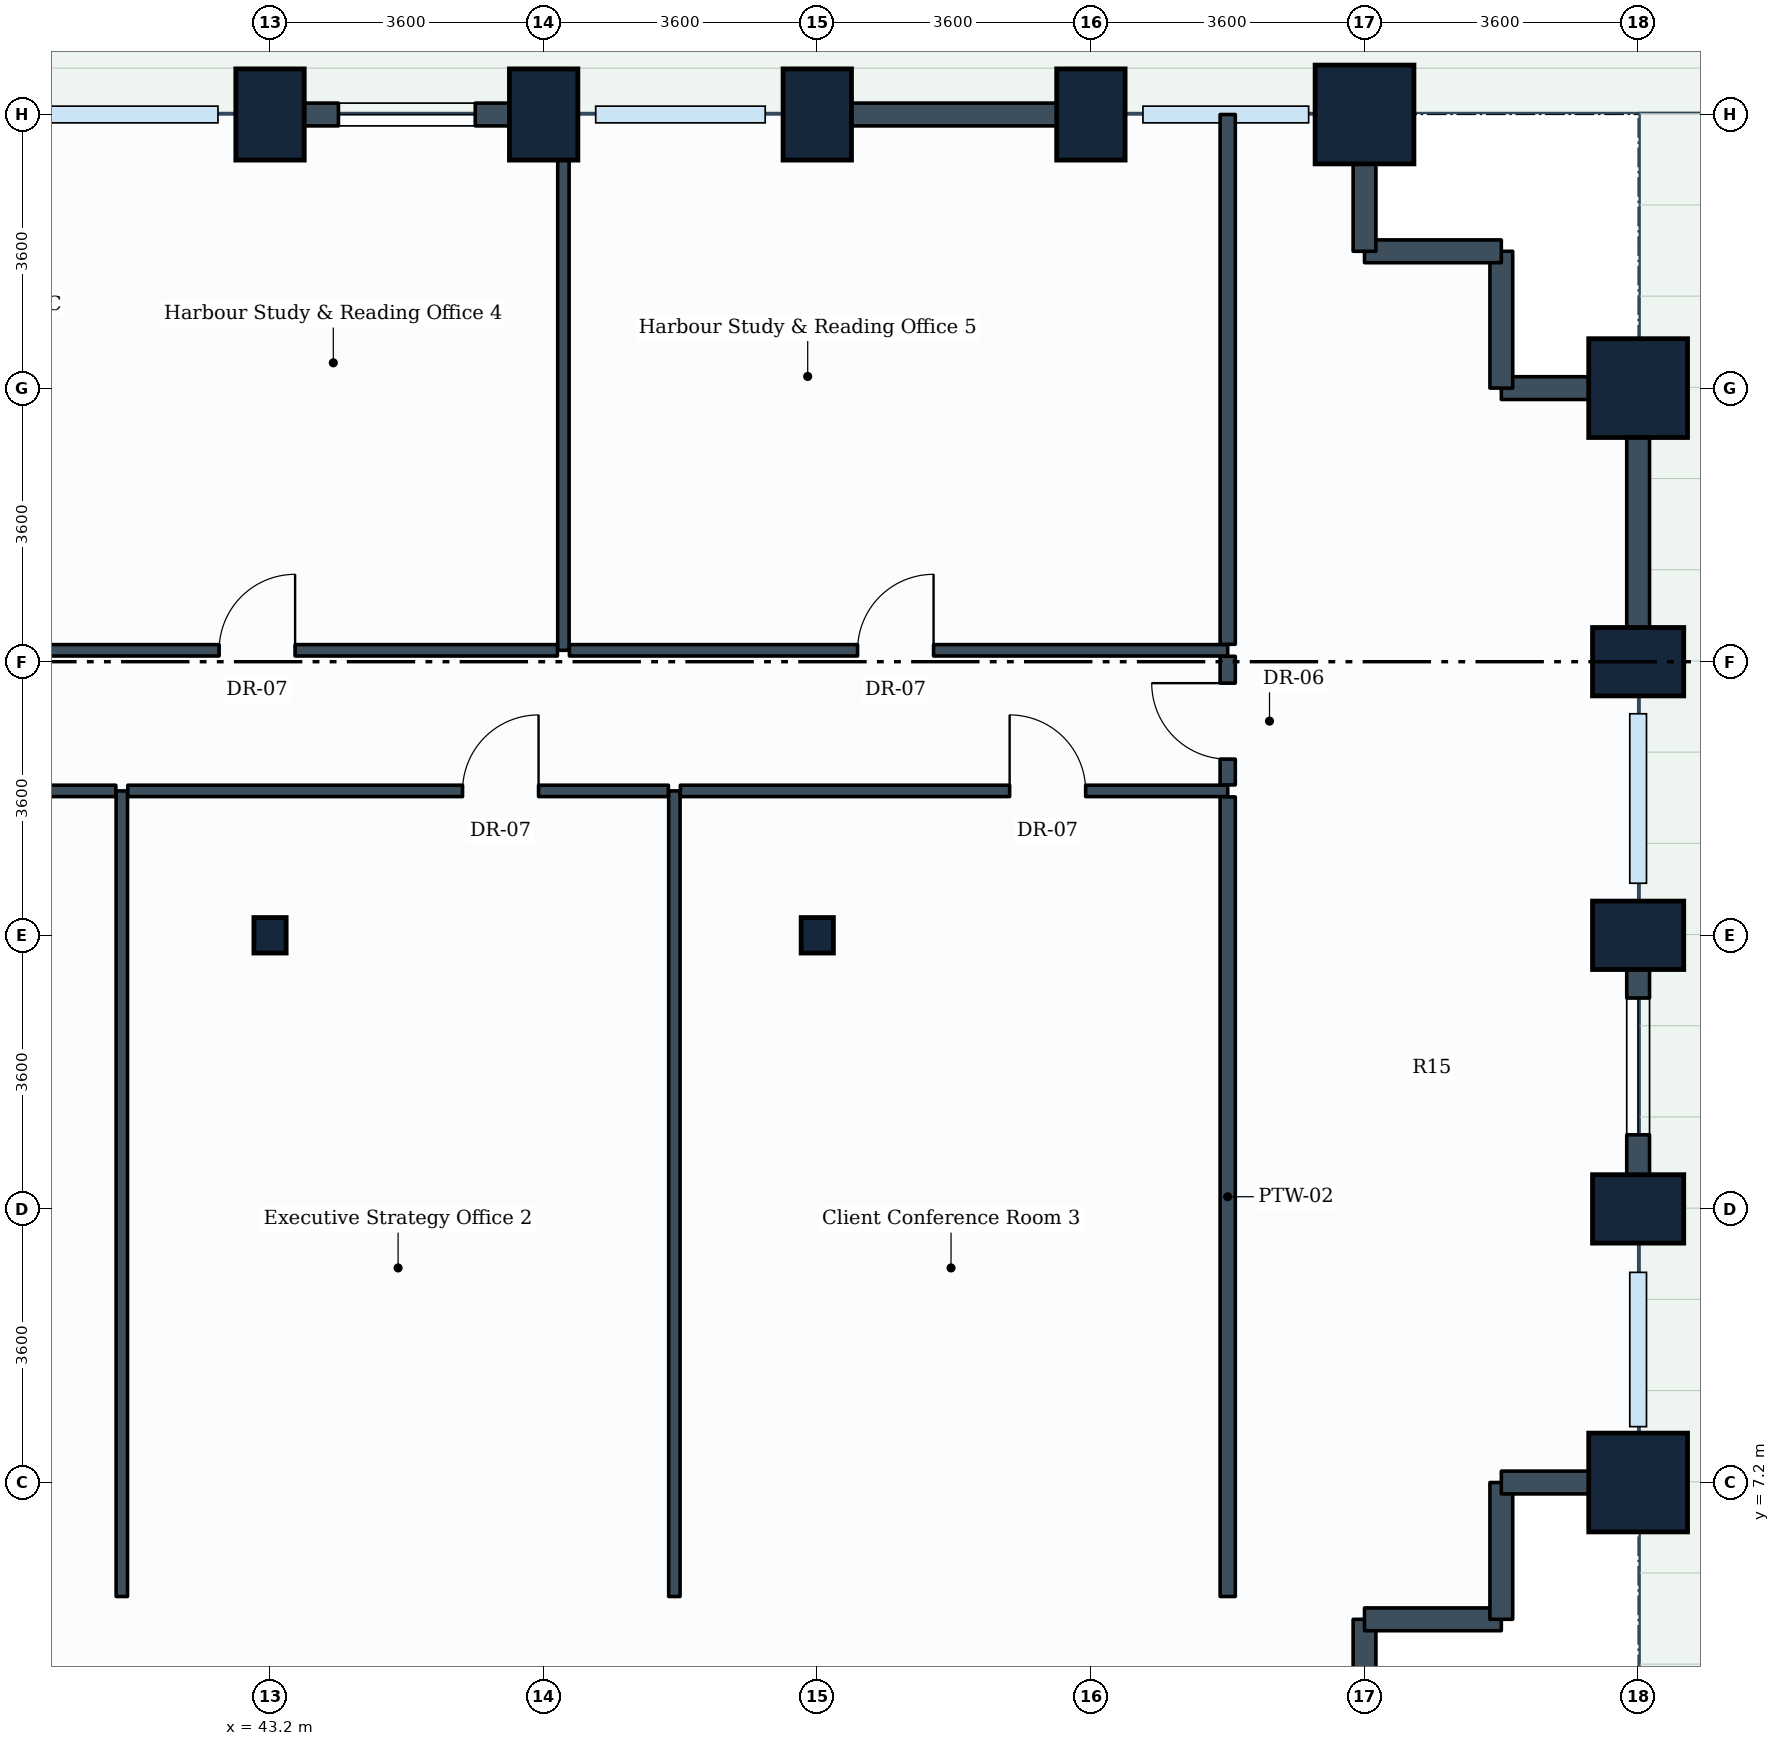
"""IFC4 building model, lengths in metres.
Left out: names, types, materials, properties, quantities, classifications, styles, units other than length and angle.
Written with IfcOpenShell. Run it as: python <this file> out.ifc"""

import sys

from ifc_helpers import new_model, si_unit, direction, frame, frame_2d, origin, origin_2d, place, context, subcontext, project, spatial, rectangle, i_section, extrude, element, fill, save


model = new_model("IFC4")
c1 = context("Model", 3, precision=1e-05, world=origin(), true_north=direction((0.0, 1.0)))
c2 = subcontext(c1, "Body", "Model", "MODEL_VIEW")
j1 = project(units=[si_unit("LENGTHUNIT", "METRE"), si_unit("PLANEANGLEUNIT", "RADIAN")], contexts=[c1])
p1 = place(None, origin())
s1 = spatial("IfcSite", under=j1, at=p1, CompositionType="ELEMENT")
p2 = place(p1, origin())
s2 = spatial("IfcBuilding", under=s1, at=p2, CompositionType="ELEMENT")
p3 = place(p2, frame((0.0, 0.0, 24.0)))
s3 = spatial("IfcBuildingStorey", under=s2, at=p3, CompositionType="ELEMENT", Elevation=24.0)
p4 = place(p3, frame((43.2, 14.4, 0.0), z_axis=(0.0, 0.0, 1.0), x_axis=(1.0, 0.0, 0.0)))
e1 = element("IfcColumn", 1, at=p4, inside=s3, PredefinedType="COLUMN", context=c2, shape_type="SweptSolid", body=[
    extrude(i_section(OverallWidth=0.424, OverallDepth=0.467, WebThickness=0.033, FlangeThickness=0.053, FilletRadius=0.015, at=origin_2d()), origin(), (0.0, 0.0, 1.0), 3.9),
])
for number, where, z_axis, x_axis in (
    (2, (43.2, 25.2, 0.0), (0.0, 0.0, 1.0), (1.0, 0.0, 0.0)),
    (3, (46.8, 25.2, 0.0), (0.0, 0.0, 1.0), (1.0, 0.0, 0.0)),
):
    element("IfcColumn", number, at=place(p3, frame(where, z_axis=z_axis, x_axis=x_axis)), inside=s3, PredefinedType="COLUMN", context=c2, shape_type="SweptSolid", body=[
        extrude(rectangle(XDim=0.9, YDim=1.2, at=origin_2d()), origin(), (0.0, 0.0, 1.0), 3.9),
    ])
p5 = place(p3, frame((50.4, 14.4, 0.0), z_axis=(0.0, 0.0, 1.0), x_axis=(1.0, 0.0, 0.0)))
e4 = element("IfcColumn", 4, at=p5, inside=s3, PredefinedType="COLUMN", context=c2, shape_type="SweptSolid", body=[
    extrude(i_section(OverallWidth=0.424, OverallDepth=0.467, WebThickness=0.033, FlangeThickness=0.053, FilletRadius=0.015, at=origin_2d()), origin(), (0.0, 0.0, 1.0), 3.9),
])
for number, where, z_axis, x_axis in (
    (5, (50.4, 25.2, 0.0), (0.0, 0.0, 1.0), (1.0, 0.0, 0.0)),
    (6, (54.0, 25.2, 0.0), (0.0, 0.0, 1.0), (1.0, 0.0, 0.0)),
):
    element("IfcColumn", number, at=place(p3, frame(where, z_axis=z_axis, x_axis=x_axis)), inside=s3, PredefinedType="COLUMN", context=c2, shape_type="SweptSolid", body=[
        extrude(rectangle(XDim=0.9, YDim=1.2, at=origin_2d()), origin(), (0.0, 0.0, 1.0), 3.9),
    ])
for number, where, z_axis, x_axis in (
    (7, (57.6, 25.2, 0.0), (0.0, 0.0, 1.0), (1.0, 0.0, 0.0)),
    (8, (61.2, 7.2, 0.0), (0.0, 0.0, 1.0), (1.0, 0.0, 0.0)),
):
    element("IfcColumn", number, at=place(p3, frame(where, z_axis=z_axis, x_axis=x_axis)), inside=s3, PredefinedType="COLUMN", context=c2, shape_type="SweptSolid", body=[
        extrude(rectangle(XDim=1.3, YDim=1.3, at=origin_2d()), origin(), (0.0, 0.0, 1.0), 3.9),
    ])
for number, where, z_axis, x_axis in (
    (9, (61.2, 10.8, 0.0), (0.0, 0.0, 1.0), (0.0, 1.0, 0.0)),
    (10, (61.2, 14.4, 0.0), (0.0, 0.0, 1.0), (0.0, 1.0, 0.0)),
    (11, (61.2, 18.0, 0.0), (0.0, 0.0, 1.0), (0.0, 1.0, 0.0)),
):
    element("IfcColumn", number, at=place(p3, frame(where, z_axis=z_axis, x_axis=x_axis)), inside=s3, PredefinedType="COLUMN", context=c2, shape_type="SweptSolid", body=[
        extrude(rectangle(XDim=0.9, YDim=1.2, at=origin_2d()), origin(), (0.0, 0.0, 1.0), 3.9),
    ])
p6 = place(p3, frame((61.2, 21.6, 0.0), z_axis=(0.0, 0.0, 1.0), x_axis=(0.0, 1.0, 0.0)))
e12 = element("IfcColumn", 12, at=p6, inside=s3, PredefinedType="COLUMN", context=c2, shape_type="SweptSolid", body=[
    extrude(rectangle(XDim=1.3, YDim=1.3, at=origin_2d()), origin(), (0.0, 0.0, 1.0), 3.9),
])
p7 = place(p3, frame((57.6, 5.4, 0.0), z_axis=(0.0, 0.0, 1.0), x_axis=(0.0, -1.0, 0.0)))
e13 = element("IfcWall", 13, at=p7, inside=s3, PredefinedType="STANDARD", context=c2, shape_type="SweptSolid", body=[
    extrude(rectangle(XDim=1.8, YDim=0.3, at=frame_2d((0.9, 0.0))), origin(), (0.0, 0.0, 1.0), 2.93),
])
p8 = place(p3, frame((59.4, 5.4, 0.0), z_axis=(0.0, 0.0, 1.0), x_axis=(-1.0, 0.0, 0.0)))
e14 = element("IfcWall", 14, at=p8, inside=s3, PredefinedType="STANDARD", context=c2, shape_type="SweptSolid", body=[
    extrude(rectangle(XDim=1.8, YDim=0.3, at=frame_2d((0.9, 0.0))), origin(), (0.0, 0.0, 1.0), 3.635),
])
p9 = place(p3, frame((59.4, 7.2, 0.0), z_axis=(0.0, 0.0, 1.0), x_axis=(0.0, -1.0, 0.0)))
e15 = element("IfcWall", 15, at=p9, inside=s3, PredefinedType="STANDARD", context=c2, shape_type="SweptSolid", body=[
    extrude(rectangle(XDim=1.8, YDim=0.3, at=frame_2d((0.9, 0.0))), origin(), (0.0, 0.0, 1.0), 3.635),
])
p10 = place(p3, frame((61.2, 7.2, 0.0), z_axis=(0.0, 0.0, 1.0), x_axis=(-1.0, 0.0, 0.0)))
e16 = element("IfcWall", 16, at=p10, inside=s3, PredefinedType="STANDARD", context=c2, shape_type="SweptSolid", body=[
    extrude(rectangle(XDim=1.8, YDim=0.3, at=frame_2d((0.9, 0.0))), origin(), (0.0, 0.0, 1.0), 2.93),
])
p11 = place(p3, frame((61.2, 14.4, 0.0), z_axis=(0.0, 0.0, 1.0), x_axis=(0.0, -1.0, 0.0)))
e17 = element("IfcWall", 17, at=p11, inside=s3, PredefinedType="STANDARD", context=c2, shape_type="SweptSolid", body=[
    extrude(rectangle(XDim=3.6, YDim=0.3, at=frame_2d((1.8, 0.0))), origin(), (0.0, 0.0, 1.0), 2.93),
])
p12 = place(p11, frame((0.825, 0.0, 0.85)))
e18 = element("IfcOpeningElement", 18, at=p12, cuts=e17, PredefinedType="OPENING", context=c2, shape_type="SweptSolid", body=[
    extrude(rectangle(XDim=1.8, YDim=1.35, at=frame_2d((0.9, 0.675))), frame((0.0, 0.16, 0.0), z_axis=(0.0, -1.0, 0.0), x_axis=(1.0, 0.0, 0.0)), (0.0, 0.0, 1.0), 0.32),
])
p13 = place(p3, frame((61.2, 21.6, 0.0), z_axis=(0.0, 0.0, 1.0), x_axis=(0.0, -1.0, 0.0)))
e19 = element("IfcWall", 19, at=p13, inside=s3, PredefinedType="STANDARD", context=c2, shape_type="SweptSolid", body=[
    extrude(rectangle(XDim=3.6, YDim=0.3, at=frame_2d((1.8, 0.0))), origin(), (0.0, 0.0, 1.0), 2.93),
])
p14 = place(p3, frame((61.2, 21.6, 0.0), z_axis=(0.0, 0.0, 1.0), x_axis=(-1.0, 0.0, 0.0)))
e20 = element("IfcWall", 20, at=p14, inside=s3, PredefinedType="STANDARD", context=c2, shape_type="SweptSolid", body=[
    extrude(rectangle(XDim=1.8, YDim=0.3, at=frame_2d((0.9, 0.0))), origin(), (0.0, 0.0, 1.0), 2.93),
])
for number, where, z_axis, x_axis in (
    (21, (59.4, 23.4, 0.0), (0.0, 0.0, 1.0), (0.0, -1.0, 0.0)),
    (22, (57.6, 23.4, 0.0), (0.0, 0.0, 1.0), (1.0, 0.0, 0.0)),
):
    element("IfcWall", number, at=place(p3, frame(where, z_axis=z_axis, x_axis=x_axis)), inside=s3, PredefinedType="STANDARD", context=c2, shape_type="SweptSolid", body=[
        extrude(rectangle(XDim=1.8, YDim=0.3, at=frame_2d((0.9, 0.0))), origin(), (0.0, 0.0, 1.0), 3.635),
    ])
p15 = place(p3, frame((57.6, 25.2, 0.0), z_axis=(0.0, 0.0, 1.0), x_axis=(0.0, -1.0, 0.0)))
e23 = element("IfcWall", 23, at=p15, inside=s3, PredefinedType="STANDARD", context=c2, shape_type="SweptSolid", body=[
    extrude(rectangle(XDim=1.8, YDim=0.3, at=frame_2d((0.9, 0.0))), origin(), (0.0, 0.0, 1.0), 2.93),
])
p16 = place(p3, frame((50.4, 25.2, 0.0), z_axis=(0.0, 0.0, 1.0), x_axis=(1.0, 0.0, 0.0)))
e24 = element("IfcWall", 24, at=p16, inside=s3, PredefinedType="STANDARD", context=c2, shape_type="SweptSolid", body=[
    extrude(rectangle(XDim=3.6, YDim=0.3, at=frame_2d((1.8, 0.0))), origin(), (0.0, 0.0, 1.0), 2.93),
])
p17 = place(p3, frame((43.2, 25.2, 0.0), z_axis=(0.0, 0.0, 1.0), x_axis=(1.0, 0.0, 0.0)))
e25 = element("IfcWall", 25, at=p17, inside=s3, PredefinedType="STANDARD", context=c2, shape_type="SweptSolid", body=[
    extrude(rectangle(XDim=3.6, YDim=0.3, at=frame_2d((1.8, 0.0))), origin(), (0.0, 0.0, 1.0), 2.93),
])
p18 = place(p17, frame((0.9, 0.0, 0.85)))
e26 = element("IfcOpeningElement", 26, at=p18, cuts=e25, PredefinedType="OPENING", context=c2, shape_type="SweptSolid", body=[
    extrude(rectangle(XDim=1.8, YDim=1.35, at=frame_2d((0.9, 0.675))), frame((0.0, 0.16, 0.0), z_axis=(0.0, -1.0, 0.0), x_axis=(1.0, 0.0, 0.0)), (0.0, 0.0, 1.0), 0.32),
])
p19 = place(p3, frame((41.25, 5.7, 0.0), z_axis=(0.0, 0.0, 1.0), x_axis=(0.0, 1.0, 0.0)))
e27 = element("IfcWall", 27, at=p19, inside=s3, PredefinedType="PARTITIONING", context=c2, shape_type="SweptSolid", body=[
    extrude(rectangle(XDim=10.6, YDim=0.15, at=frame_2d((5.3, 0.0))), origin(), (0.0, 0.0, 1.0), 3.03),
])
p20 = place(p3, frame((34.479, 16.3, 0.0), z_axis=(0.0, 0.0, 1.0), x_axis=(1.0, 0.0, 0.0)))
e28 = element("IfcWall", 28, at=p20, inside=s3, PredefinedType="PARTITIONING", context=c2, shape_type="SweptSolid", body=[
    extrude(rectangle(XDim=6.692, YDim=0.15, at=frame_2d((3.346, 0.0))), origin(), (0.0, 0.0, 1.0), 3.04),
])
p21 = place(p20, frame((2.807, 0.0, 0.0)))
e29 = element("IfcOpeningElement", 29, at=p21, cuts=e28, PredefinedType="OPENING", context=c2, shape_type="SweptSolid", body=[
    extrude(rectangle(XDim=1.0, YDim=2.1, at=frame_2d((0.5, 1.05))), frame((0.0, 0.085, 0.0), z_axis=(0.0, -1.0, 0.0), x_axis=(1.0, 0.0, 0.0)), (0.0, 0.0, 1.0), 0.17),
])
p22 = place(p3, frame((48.52, 5.7, 0.0), z_axis=(0.0, 0.0, 1.0), x_axis=(0.0, 1.0, 0.0)))
e30 = element("IfcWall", 30, at=p22, inside=s3, PredefinedType="PARTITIONING", context=c2, shape_type="SweptSolid", body=[
    extrude(rectangle(XDim=10.6, YDim=0.15, at=frame_2d((5.3, 0.0))), origin(), (0.0, 0.0, 1.0), 3.03),
])
p23 = place(p3, frame((41.329, 16.3, 0.0), z_axis=(0.0, 0.0, 1.0), x_axis=(1.0, 0.0, 0.0)))
e31 = element("IfcWall", 31, at=p23, inside=s3, PredefinedType="PARTITIONING", context=c2, shape_type="SweptSolid", body=[
    extrude(rectangle(XDim=7.112, YDim=0.15, at=frame_2d((3.556, 0.0))), origin(), (0.0, 0.0, 1.0), 3.04),
])
p24 = place(p23, frame((4.404, 0.0, 0.0)))
e32 = element("IfcOpeningElement", 32, at=p24, cuts=e31, PredefinedType="OPENING", context=c2, shape_type="SweptSolid", body=[
    extrude(rectangle(XDim=1.0, YDim=2.1, at=frame_2d((0.5, 1.05))), frame((0.0, 0.085, 0.0), z_axis=(0.0, -1.0, 0.0), x_axis=(1.0, 0.0, 0.0)), (0.0, 0.0, 1.0), 0.17),
])
p25 = place(p3, frame((48.599, 16.3, 0.0), z_axis=(0.0, 0.0, 1.0), x_axis=(1.0, 0.0, 0.0)))
e33 = element("IfcWall", 33, at=p25, inside=s3, PredefinedType="PARTITIONING", context=c2, shape_type="SweptSolid", body=[
    extrude(rectangle(XDim=7.201, YDim=0.15, at=frame_2d((3.601, 0.0))), origin(), (0.0, 0.0, 1.0), 3.04),
])
p26 = place(p25, frame((4.332, 0.0, 0.0)))
e34 = element("IfcOpeningElement", 34, at=p26, cuts=e33, PredefinedType="OPENING", context=c2, shape_type="SweptSolid", body=[
    extrude(rectangle(XDim=1.0, YDim=2.1, at=frame_2d((0.5, 1.05))), frame((0.0, 0.085, 0.0), z_axis=(0.0, -1.0, 0.0), x_axis=(1.0, 0.0, 0.0)), (0.0, 0.0, 1.0), 0.17),
])
p27 = place(p3, frame((47.06, 18.15, 0.0), z_axis=(0.0, 0.0, 1.0), x_axis=(0.0, 1.0, 0.0)))
e35 = element("IfcWall", 35, at=p27, inside=s3, PredefinedType="PARTITIONING", context=c2, shape_type="SweptSolid", body=[
    extrude(rectangle(XDim=7.05, YDim=0.15, at=frame_2d((3.525, 0.0))), origin(), (0.0, 0.0, 1.0), 2.93),
])
p28 = place(p3, frame((39.0, 18.15, 0.0), z_axis=(0.0, 0.0, 1.0), x_axis=(1.0, 0.0, 0.0)))
e36 = element("IfcWall", 36, at=p28, inside=s3, PredefinedType="PARTITIONING", context=c2, shape_type="SweptSolid", body=[
    extrude(rectangle(XDim=7.981, YDim=0.15, at=frame_2d((3.99, 0.0))), origin(), (0.0, 0.0, 1.0), 3.03),
])
p29 = place(p28, frame((3.53, 0.0, 0.0)))
e37 = element("IfcOpeningElement", 37, at=p29, cuts=e36, PredefinedType="OPENING", context=c2, shape_type="SweptSolid", body=[
    extrude(rectangle(XDim=1.0, YDim=2.1, at=frame_2d((0.5, 1.05))), frame((0.0, 0.085, 0.0), z_axis=(0.0, -1.0, 0.0), x_axis=(1.0, 0.0, 0.0)), (0.0, 0.0, 1.0), 0.17),
])
p30 = place(p3, frame((47.139, 18.15, 0.0), z_axis=(0.0, 0.0, 1.0), x_axis=(1.0, 0.0, 0.0)))
e38 = element("IfcWall", 38, at=p30, inside=s3, PredefinedType="PARTITIONING", context=c2, shape_type="SweptSolid", body=[
    extrude(rectangle(XDim=8.661, YDim=0.15, at=frame_2d((4.331, 0.0))), origin(), (0.0, 0.0, 1.0), 3.04),
])
p31 = place(p30, frame((3.791, 0.0, 0.0)))
e39 = element("IfcOpeningElement", 39, at=p31, cuts=e38, PredefinedType="OPENING", context=c2, shape_type="SweptSolid", body=[
    extrude(rectangle(XDim=1.0, YDim=2.1, at=frame_2d((0.5, 1.05))), frame((0.0, 0.085, 0.0), z_axis=(0.0, -1.0, 0.0), x_axis=(1.0, 0.0, 0.0)), (0.0, 0.0, 1.0), 0.17),
])
p32 = place(p3, frame((55.8, 5.7, 0.0), z_axis=(0.0, 0.0, 1.0), x_axis=(0.0, 1.0, 0.0)))
e40 = element("IfcWall", 40, at=p32, inside=s3, PredefinedType="PARTITIONING", context=c2, shape_type="SweptSolid", body=[
    extrude(rectangle(XDim=10.521, YDim=0.2, at=frame_2d((5.26, 0.0))), origin(), (0.0, 0.0, 1.0), 3.08),
])
p33 = place(p3, frame((55.8, 18.229, 0.0), z_axis=(0.0, 0.0, 1.0), x_axis=(0.0, 1.0, 0.0)))
e41 = element("IfcWall", 41, at=p33, inside=s3, PredefinedType="PARTITIONING", context=c2, shape_type="SweptSolid", body=[
    extrude(rectangle(XDim=6.971, YDim=0.2, at=frame_2d((3.485, 0.0))), origin(), (0.0, 0.0, 1.0), 2.93),
])
p34 = place(p3, frame((55.8, 16.379, 0.0), z_axis=(0.0, 0.0, 1.0), x_axis=(0.0, 1.0, 0.0)))
e42 = element("IfcWall", 42, at=p34, inside=s3, PredefinedType="PARTITIONING", context=c2, shape_type="SweptSolid", body=[
    extrude(rectangle(XDim=1.692, YDim=0.2, at=frame_2d((0.846, 0.0))), origin(), (0.0, 0.0, 1.0), 3.635),
])
p35 = place(p34, frame((0.339, 0.0, 0.0)))
e43 = element("IfcOpeningElement", 43, at=p35, cuts=e42, PredefinedType="OPENING", context=c2, shape_type="SweptSolid", body=[
    extrude(rectangle(XDim=1.0, YDim=2.1, at=frame_2d((0.5, 1.05))), frame((0.0, 0.11, 0.0), z_axis=(0.0, -1.0, 0.0), x_axis=(1.0, 0.0, 0.0)), (0.0, 0.0, 1.0), 0.22),
])
p36 = place(p12, origin())
e44 = element("IfcWindow", 44, at=p36, inside=s3, PartitioningType="SINGLE_PANEL", PredefinedType="WINDOW", context=c2, shape_type="SweptSolid", body=[
    extrude(rectangle(XDim=1.8, YDim=1.35, at=frame_2d((0.9, 0.675))), frame((0.0, 0.03, 0.0), z_axis=(0.0, -1.0, 0.0), x_axis=(1.0, 0.0, 0.0)), (0.0, 0.0, 1.0), 0.06),
])
fill(e18, e44)
p37 = place(p18, origin())
e45 = element("IfcWindow", 45, at=p37, inside=s3, PartitioningType="SINGLE_PANEL", PredefinedType="WINDOW", context=c2, shape_type="SweptSolid", body=[
    extrude(rectangle(XDim=1.8, YDim=1.35, at=frame_2d((0.9, 0.675))), frame((0.0, 0.03, 0.0), z_axis=(0.0, -1.0, 0.0), x_axis=(1.0, 0.0, 0.0)), (0.0, 0.0, 1.0), 0.06),
])
fill(e26, e45)
p38 = place(p24, origin())
e46 = element("IfcDoor", 46, at=p38, inside=s3, OperationType="SINGLE_SWING_RIGHT", PredefinedType="DOOR", context=c2, shape_type="SweptSolid", body=[
    extrude(rectangle(XDim=1.0, YDim=2.1, at=frame_2d((0.5, 1.05))), frame((0.0, 0.025, 0.0), z_axis=(0.0, -1.0, 0.0), x_axis=(1.0, 0.0, 0.0)), (0.0, 0.0, 1.0), 0.05),
])
fill(e32, e46)
p39 = place(p26, origin())
e47 = element("IfcDoor", 47, at=p39, inside=s3, OperationType="SINGLE_SWING_LEFT", PredefinedType="DOOR", context=c2, shape_type="SweptSolid", body=[
    extrude(rectangle(XDim=1.0, YDim=2.1, at=frame_2d((0.5, 1.05))), frame((0.0, 0.025, 0.0), z_axis=(0.0, -1.0, 0.0), x_axis=(1.0, 0.0, 0.0)), (0.0, 0.0, 1.0), 0.05),
])
fill(e34, e47)
p40 = place(p29, origin())
e48 = element("IfcDoor", 48, at=p40, inside=s3, OperationType="SINGLE_SWING_RIGHT", PredefinedType="DOOR", context=c2, shape_type="SweptSolid", body=[
    extrude(rectangle(XDim=1.0, YDim=2.1, at=frame_2d((0.5, 1.05))), frame((0.0, 0.025, 0.0), z_axis=(0.0, -1.0, 0.0), x_axis=(1.0, 0.0, 0.0)), (0.0, 0.0, 1.0), 0.05),
])
fill(e37, e48)
p41 = place(p31, origin())
e49 = element("IfcDoor", 49, at=p41, inside=s3, OperationType="SINGLE_SWING_RIGHT", PredefinedType="DOOR", context=c2, shape_type="SweptSolid", body=[
    extrude(rectangle(XDim=1.0, YDim=2.1, at=frame_2d((0.5, 1.05))), frame((0.0, 0.025, 0.0), z_axis=(0.0, -1.0, 0.0), x_axis=(1.0, 0.0, 0.0)), (0.0, 0.0, 1.0), 0.05),
])
fill(e39, e49)
p42 = place(p35, origin())
e50 = element("IfcDoor", 50, at=p42, inside=s3, OperationType="SINGLE_SWING_RIGHT", PredefinedType="DOOR", context=c2, shape_type="SweptSolid", body=[
    extrude(rectangle(XDim=1.0, YDim=2.1, at=frame_2d((0.5, 1.05))), frame((0.0, 0.025, 0.0), z_axis=(0.0, -1.0, 0.0), x_axis=(1.0, 0.0, 0.0)), (0.0, 0.0, 1.0), 0.05),
])
fill(e43, e50)
save(model, sys.argv[1])
